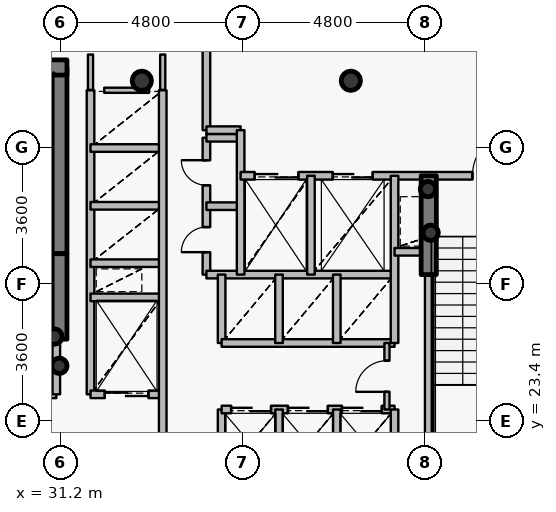
"""IFC4 building model, lengths in metres.
Left out: names, types, materials, properties, quantities, classifications, styles, units other than length and angle.
Written with IfcOpenShell. Run it as: python <this file> out.ifc"""

import sys

from ifc_helpers import new_model, si_unit, direction, frame, frame_2d, origin, origin_2d, place, context, subcontext, project, spatial, rectangle, hollow_circle, extrude, source, transform, mapped, element, fill, save


model = new_model("IFC4")
c1 = context("Model", 3, precision=1e-05, world=origin(), true_north=direction((0.0, 1.0)))
c2 = subcontext(c1, "Body", "Model", "MODEL_VIEW")
j1 = project(units=[si_unit("LENGTHUNIT", "METRE"), si_unit("PLANEANGLEUNIT", "RADIAN")], contexts=[c1])
p1 = place(None, origin())
s1 = spatial("IfcSite", under=j1, at=p1, CompositionType="ELEMENT")
p2 = place(p1, origin())
s2 = spatial("IfcBuilding", under=s1, at=p2, CompositionType="ELEMENT")
p3 = place(p2, frame((0.0, 0.0, 36.6)))
s3 = spatial("IfcBuildingStorey", under=s2, at=p3, CompositionType="ELEMENT", Elevation=36.6)
for number, where, z_axis, x_axis in (
    (1, (38.85, 32.35, 0.0), (0.0, 0.0, 1.0), (1.0, 0.0, 0.0)),
    (2, (33.35, 32.35, 0.0), (0.0, 0.0, 1.0), (1.0, 0.0, 0.0)),
):
    element("IfcColumn", number, at=place(p3, frame(where, z_axis=z_axis, x_axis=x_axis)), inside=s3, PredefinedType="COLUMN", context=c2, shape_type="SweptSolid", body=[
        extrude(hollow_circle(Radius=0.254, WallThickness=0.02, at=origin_2d()), origin(), (0.0, 0.0, 1.0), 4.2),
    ])
p4 = place(p3, frame((31.18, 27.8, 0.0), z_axis=(0.0, 0.0, 1.0), x_axis=(0.0, 1.0, 0.0)))
e3 = element("IfcWall", 3, at=p4, inside=s3, PredefinedType="SHEAR", context=c2, shape_type="SweptSolid", body=[
    extrude(rectangle(XDim=4.9, YDim=0.4, at=frame_2d((2.45, 0.0))), origin(), (0.0, 0.0, 1.0), 4.2),
])
p5 = place(p3, frame((27.28, 32.7, 0.0), z_axis=(0.0, 0.0, 1.0), x_axis=(1.0, 0.0, 0.0)))
e4 = element("IfcWall", 4, at=p5, inside=s3, PredefinedType="SHEAR", context=c2, shape_type="SweptSolid", body=[
    extrude(rectangle(XDim=4.1, YDim=0.4, at=frame_2d((2.05, 0.0))), origin(), (0.0, 0.0, 1.0), 4.2),
])
for number, where, z_axis, x_axis in (
    (5, (31.05, 25.62, 0.0), (0.0, 0.0, 1.0), (1.0, 0.0, 0.0)),
    (6, (31.18, 24.85, 0.0), (0.0, 0.0, 1.0), (1.0, 0.0, 0.0)),
    (7, (40.95, 28.35, 0.0), (0.0, 0.0, 1.0), (1.0, 0.0, 0.0)),
    (8, (40.88, 29.5, 0.0), (0.0, 0.0, 1.0), (1.0, 0.0, 0.0)),
):
    element("IfcColumn", number, at=place(p3, frame(where, z_axis=z_axis, x_axis=x_axis)), inside=s3, PredefinedType="COLUMN", context=c2, shape_type="SweptSolid", body=[
        extrude(hollow_circle(Radius=0.203, WallThickness=0.016, at=origin_2d()), origin(), (0.0, 0.0, 1.0), 4.2),
    ])
p6 = place(p3, frame((31.18, 25.55, 0.0), z_axis=(0.0, 0.0, 1.0), x_axis=(0.0, 1.0, 0.0)))
e9 = element("IfcWall", 9, at=p6, inside=s3, PredefinedType="SHEAR", context=c2, shape_type="SweptSolid", body=[
    extrude(rectangle(XDim=2.25, YDim=0.4, at=frame_2d((1.125, 0.0))), origin(), (0.0, 0.0, 1.0), 3.55),
])
p7 = place(p3, frame((40.9, 27.25, 0.0), z_axis=(0.0, 0.0, 1.0), x_axis=(0.0, 1.0, 0.0)))
e10 = element("IfcWall", 10, at=p7, inside=s3, PredefinedType="SHEAR", context=c2, shape_type="SweptSolid", body=[
    extrude(rectangle(XDim=2.6, YDim=0.4, at=frame_2d((1.3, 0.0))), origin(), (0.0, 0.0, 1.0), 3.55),
])
p8 = place(p3, frame((27.56, 24.1, 0.0), z_axis=(0.0, 0.0, 1.0), x_axis=(1.0, 0.0, 0.0)))
e11 = element("IfcWall", 11, at=p8, inside=s3, PredefinedType="PARTITIONING", context=c2, shape_type="SweptSolid", body=[
    extrude(rectangle(XDim=3.54, YDim=0.2, at=frame_2d((1.77, 0.0))), origin(), (0.0, 0.0, 1.0), 3.95),
])
p9 = place(p8, frame((1.17, 0.0, 0.0)))
e12 = element("IfcOpeningElement", 12, at=p9, cuts=e11, PredefinedType="OPENING", context=c2, shape_type="SweptSolid", body=[
    extrude(rectangle(XDim=1.2, YDim=2.15, at=origin_2d()), frame((0.6, 0.11, 1.075), z_axis=(0.0, -1.0, 0.0), x_axis=(1.0, 0.0, 0.0)), (0.0, 0.0, 1.0), 0.22),
])
p10 = place(p3, frame((31.1, 24.1, 0.0), z_axis=(0.0, 0.0, 1.0), x_axis=(0.0, 1.0, 0.0)))
e13 = element("IfcWall", 13, at=p10, inside=s3, PredefinedType="PARTITIONING", context=c2, shape_type="SweptSolid", body=[
    extrude(rectangle(XDim=1.44, YDim=0.2, at=frame_2d((0.72, 0.0))), origin(), (0.0, 0.0, 1.0), 3.95),
])
p11 = place(p3, frame((32.0, 24.1, 0.0), z_axis=(0.0, 0.0, 1.0), x_axis=(0.0, 1.0, 0.0)))
e14 = element("IfcWall", 14, at=p11, inside=s3, PredefinedType="PARTITIONING", context=c2, shape_type="SweptSolid", body=[
    extrude(rectangle(XDim=8.0, YDim=0.2, at=frame_2d((4.0, 0.0))), origin(), (0.0, 0.0, 1.0), 3.95),
])
p12 = place(p3, frame((32.0, 24.1, 0.0), z_axis=(0.0, 0.0, 1.0), x_axis=(1.0, 0.0, 0.0)))
e15 = element("IfcWall", 15, at=p12, inside=s3, PredefinedType="PARTITIONING", context=c2, shape_type="SweptSolid", body=[
    extrude(rectangle(XDim=1.9, YDim=0.2, at=frame_2d((0.95, 0.0))), origin(), (0.0, 0.0, 1.0), 3.535),
])
p13 = place(p12, frame((0.375, 0.0, 0.0)))
e16 = element("IfcOpeningElement", 16, at=p13, cuts=e15, PredefinedType="OPENING", context=c2, shape_type="SweptSolid", body=[
    extrude(rectangle(XDim=1.15, YDim=2.15, at=origin_2d()), frame((0.575, 0.11, 1.075), z_axis=(0.0, -1.0, 0.0), x_axis=(1.0, 0.0, 0.0)), (0.0, 0.0, 1.0), 0.22),
])
for number, where, z_axis, x_axis in (
    (17, (32.0, 26.65, 0.0), (0.0, 0.0, 1.0), (1.0, 0.0, 0.0)),
    (18, (32.0, 27.55, 0.0), (0.0, 0.0, 1.0), (1.0, 0.0, 0.0)),
    (19, (32.0, 29.06, 0.0), (0.0, 0.0, 1.0), (1.0, 0.0, 0.0)),
    (20, (32.0, 30.58, 0.0), (0.0, 0.0, 1.0), (1.0, 0.0, 0.0)),
):
    element("IfcWall", number, at=place(p3, frame(where, z_axis=z_axis, x_axis=x_axis)), inside=s3, PredefinedType="PARTITIONING", context=c2, shape_type="SweptSolid", body=[
        extrude(rectangle(XDim=1.9, YDim=0.2, at=frame_2d((0.95, 0.0))), origin(), (0.0, 0.0, 1.0), 3.535),
    ])
p14 = place(p3, frame((33.9, 20.7, 0.0), z_axis=(0.0, 0.0, 1.0), x_axis=(0.0, 1.0, 0.0)))
e21 = element("IfcWall", 21, at=p14, inside=s3, PredefinedType="PARTITIONING", context=c2, shape_type="SweptSolid", body=[
    extrude(rectangle(XDim=11.4, YDim=0.2, at=frame_2d((5.7, 0.0))), origin(), (0.0, 0.0, 1.0), 3.535),
])
p15 = place(p3, frame((35.05, 27.25, 0.0), z_axis=(0.0, 0.0, 1.0), x_axis=(0.0, 1.0, 0.0)))
e22 = element("IfcWall", 22, at=p15, inside=s3, PredefinedType="PARTITIONING", context=c2, shape_type="SweptSolid", body=[
    extrude(rectangle(XDim=3.6, YDim=0.2, at=frame_2d((1.8, 0.0))), origin(), (0.0, 0.0, 1.0), 3.95),
])
p16 = place(p15, frame((0.59, 0.0, 0.0)))
e23 = element("IfcOpeningElement", 23, at=p16, cuts=e22, PredefinedType="OPENING", context=c2, shape_type="SweptSolid", body=[
    extrude(rectangle(XDim=0.66, YDim=2.05, at=origin_2d()), frame((0.33, 0.11, 1.025), z_axis=(0.0, -1.0, 0.0), x_axis=(1.0, 0.0, 0.0)), (0.0, 0.0, 1.0), 0.22),
])
p17 = place(p15, frame((2.35, 0.0, 0.0)))
e24 = element("IfcOpeningElement", 24, at=p17, cuts=e22, PredefinedType="OPENING", context=c2, shape_type="SweptSolid", body=[
    extrude(rectangle(XDim=0.66, YDim=2.05, at=origin_2d()), frame((0.33, 0.11, 1.025), z_axis=(0.0, -1.0, 0.0), x_axis=(1.0, 0.0, 0.0)), (0.0, 0.0, 1.0), 0.22),
])
p18 = place(p3, frame((35.05, 27.25, 0.0), z_axis=(0.0, 0.0, 1.0), x_axis=(1.0, 0.0, 0.0)))
e25 = element("IfcWall", 25, at=p18, inside=s3, PredefinedType="PARTITIONING", context=c2, shape_type="SweptSolid", body=[
    extrude(rectangle(XDim=4.95, YDim=0.2, at=frame_2d((2.475, 0.0))), origin(), (0.0, 0.0, 1.0), 3.535),
])
for number, where, z_axis, x_axis in (
    (26, (35.05, 29.05, 0.0), (0.0, 0.0, 1.0), (1.0, 0.0, 0.0)),
    (27, (35.05, 30.85, 0.0), (0.0, 0.0, 1.0), (1.0, 0.0, 0.0)),
):
    element("IfcWall", number, at=place(p3, frame(where, z_axis=z_axis, x_axis=x_axis)), inside=s3, PredefinedType="PARTITIONING", context=c2, shape_type="SweptSolid", body=[
        extrude(rectangle(XDim=0.9, YDim=0.2, at=frame_2d((0.45, 0.0))), origin(), (0.0, 0.0, 1.0), 3.95),
    ])
p19 = place(p3, frame((35.05, 31.05, 0.0), z_axis=(0.0, 0.0, 1.0), x_axis=(0.0, 1.0, 0.0)))
e28 = element("IfcWall", 28, at=p19, inside=s3, PredefinedType="PARTITIONING", context=c2, shape_type="SweptSolid", body=[
    extrude(rectangle(XDim=2.25, YDim=0.2, at=frame_2d((1.125, 0.0))), origin(), (0.0, 0.0, 1.0), 3.535),
])
p20 = place(p3, frame((35.05, 31.05, 0.0), z_axis=(0.0, 0.0, 1.0), x_axis=(1.0, 0.0, 0.0)))
e29 = element("IfcWall", 29, at=p20, inside=s3, PredefinedType="PARTITIONING", context=c2, shape_type="SweptSolid", body=[
    extrude(rectangle(XDim=0.9, YDim=0.2, at=frame_2d((0.45, 0.0))), origin(), (0.0, 0.0, 1.0), 3.95),
])
p21 = place(p3, frame((35.45, 21.9, 0.0), z_axis=(0.0, 0.0, 1.0), x_axis=(0.0, 1.0, 0.0)))
e30 = element("IfcWall", 30, at=p21, inside=s3, PredefinedType="PARTITIONING", context=c2, shape_type="SweptSolid", body=[
    extrude(rectangle(XDim=1.8, YDim=0.2, at=frame_2d((0.9, 0.0))), origin(), (0.0, 0.0, 1.0), 3.95),
])
p22 = place(p3, frame((35.45, 23.7, 0.0), z_axis=(0.0, 0.0, 1.0), x_axis=(1.0, 0.0, 0.0)))
e31 = element("IfcWall", 31, at=p22, inside=s3, PredefinedType="PARTITIONING", context=c2, shape_type="SweptSolid", body=[
    extrude(rectangle(XDim=4.55, YDim=0.2, at=frame_2d((2.275, 0.0))), origin(), (0.0, 0.0, 1.0), 3.535),
])
p23 = place(p22, frame((0.25, 0.0, 0.0)))
e32 = element("IfcOpeningElement", 32, at=p23, cuts=e31, PredefinedType="OPENING", context=c2, shape_type="SweptSolid", body=[
    extrude(rectangle(XDim=1.05, YDim=2.15, at=origin_2d()), frame((0.525, 0.11, 1.075), z_axis=(0.0, -1.0, 0.0), x_axis=(1.0, 0.0, 0.0)), (0.0, 0.0, 1.0), 0.22),
])
p24 = place(p22, frame((1.745, 0.0, 0.0)))
e33 = element("IfcOpeningElement", 33, at=p24, cuts=e31, PredefinedType="OPENING", context=c2, shape_type="SweptSolid", body=[
    extrude(rectangle(XDim=1.05, YDim=2.15, at=origin_2d()), frame((0.525, 0.11, 1.075), z_axis=(0.0, -1.0, 0.0), x_axis=(1.0, 0.0, 0.0)), (0.0, 0.0, 1.0), 0.22),
])
p25 = place(p22, frame((3.165, 0.0, 0.0)))
e34 = element("IfcOpeningElement", 34, at=p25, cuts=e31, PredefinedType="OPENING", context=c2, shape_type="SweptSolid", body=[
    extrude(rectangle(XDim=1.05, YDim=2.15, at=origin_2d()), frame((0.525, 0.11, 1.075), z_axis=(0.0, -1.0, 0.0), x_axis=(1.0, 0.0, 0.0)), (0.0, 0.0, 1.0), 0.22),
])
p26 = place(p3, frame((35.45, 25.45, 0.0), z_axis=(0.0, 0.0, 1.0), x_axis=(0.0, 1.0, 0.0)))
e35 = element("IfcWall", 35, at=p26, inside=s3, PredefinedType="PARTITIONING", context=c2, shape_type="SweptSolid", body=[
    extrude(rectangle(XDim=1.8, YDim=0.2, at=frame_2d((0.9, 0.0))), origin(), (0.0, 0.0, 1.0), 3.95),
])
p27 = place(p3, frame((35.45, 25.45, 0.0), z_axis=(0.0, 0.0, 1.0), x_axis=(1.0, 0.0, 0.0)))
e36 = element("IfcWall", 36, at=p27, inside=s3, PredefinedType="PARTITIONING", context=c2, shape_type="SweptSolid", body=[
    extrude(rectangle(XDim=4.55, YDim=0.2, at=frame_2d((2.275, 0.0))), origin(), (0.0, 0.0, 1.0), 3.535),
])
p28 = place(p3, frame((35.95, 27.25, 0.0), z_axis=(0.0, 0.0, 1.0), x_axis=(0.0, 1.0, 0.0)))
e37 = element("IfcWall", 37, at=p28, inside=s3, PredefinedType="PARTITIONING", context=c2, shape_type="SweptSolid", body=[
    extrude(rectangle(XDim=3.8, YDim=0.2, at=frame_2d((1.9, 0.0))), origin(), (0.0, 0.0, 1.0), 3.95),
])
p29 = place(p3, frame((35.95, 29.85, 0.0), z_axis=(0.0, 0.0, 1.0), x_axis=(1.0, 0.0, 0.0)))
e38 = element("IfcWall", 38, at=p29, inside=s3, PredefinedType="PARTITIONING", context=c2, shape_type="SweptSolid", body=[
    extrude(rectangle(XDim=8.49, YDim=0.2, at=frame_2d((4.245, 0.0))), origin(), (0.0, 0.0, 1.0), 3.535),
])
p30 = place(p29, frame((6.1, 0.0, 0.0)))
e39 = element("IfcOpeningElement", 39, at=p30, cuts=e38, PredefinedType="OPENING", context=c2, shape_type="SweptSolid", body=[
    extrude(rectangle(XDim=1.2, YDim=2.15, at=origin_2d()), frame((0.6, 0.11, 1.075), z_axis=(0.0, -1.0, 0.0), x_axis=(1.0, 0.0, 0.0)), (0.0, 0.0, 1.0), 0.22),
])
p31 = place(p29, frame((0.37, 0.0, 0.0)))
e40 = element("IfcOpeningElement", 40, at=p31, cuts=e38, PredefinedType="OPENING", context=c2, shape_type="SweptSolid", body=[
    extrude(rectangle(XDim=1.15, YDim=2.15, at=origin_2d()), frame((0.575, 0.11, 1.075), z_axis=(0.0, -1.0, 0.0), x_axis=(1.0, 0.0, 0.0)), (0.0, 0.0, 1.0), 0.22),
])
p32 = place(p29, frame((2.425, 0.0, 0.0)))
e41 = element("IfcOpeningElement", 41, at=p32, cuts=e38, PredefinedType="OPENING", context=c2, shape_type="SweptSolid", body=[
    extrude(rectangle(XDim=1.05, YDim=2.15, at=origin_2d()), frame((0.525, 0.11, 1.075), z_axis=(0.0, -1.0, 0.0), x_axis=(1.0, 0.0, 0.0)), (0.0, 0.0, 1.0), 0.22),
])
for number, where, z_axis, x_axis in (
    (42, (36.96, 21.9, 0.0), (0.0, 0.0, 1.0), (0.0, 1.0, 0.0)),
    (43, (36.96, 25.45, 0.0), (0.0, 0.0, 1.0), (0.0, 1.0, 0.0)),
):
    element("IfcWall", number, at=place(p3, frame(where, z_axis=z_axis, x_axis=x_axis)), inside=s3, PredefinedType="PARTITIONING", context=c2, shape_type="SweptSolid", body=[
        extrude(rectangle(XDim=1.8, YDim=0.2, at=frame_2d((0.9, 0.0))), origin(), (0.0, 0.0, 1.0), 3.95),
    ])
p33 = place(p3, frame((37.8, 27.25, 0.0), z_axis=(0.0, 0.0, 1.0), x_axis=(0.0, 1.0, 0.0)))
e44 = element("IfcWall", 44, at=p33, inside=s3, PredefinedType="PARTITIONING", context=c2, shape_type="SweptSolid", body=[
    extrude(rectangle(XDim=2.6, YDim=0.2, at=frame_2d((1.3, 0.0))), origin(), (0.0, 0.0, 1.0), 3.95),
])
for number, where, z_axis, x_axis in (
    (45, (38.48, 21.9, 0.0), (0.0, 0.0, 1.0), (0.0, 1.0, 0.0)),
    (46, (38.48, 25.45, 0.0), (0.0, 0.0, 1.0), (0.0, 1.0, 0.0)),
):
    element("IfcWall", number, at=place(p3, frame(where, z_axis=z_axis, x_axis=x_axis)), inside=s3, PredefinedType="PARTITIONING", context=c2, shape_type="SweptSolid", body=[
        extrude(rectangle(XDim=1.8, YDim=0.2, at=frame_2d((0.9, 0.0))), origin(), (0.0, 0.0, 1.0), 3.95),
    ])
p34 = place(p3, frame((39.8, 23.7, 0.0), z_axis=(0.0, 0.0, 1.0), x_axis=(0.0, 1.0, 0.0)))
e47 = element("IfcWall", 47, at=p34, inside=s3, PredefinedType="PARTITIONING", context=c2, shape_type="SweptSolid", body=[
    extrude(rectangle(XDim=1.75, YDim=0.135, at=frame_2d((0.875, 0.0))), origin(), (0.0, 0.0, 1.0), 3.95),
])
p35 = place(p34, frame((0.465, 0.0, 0.0)))
e48 = element("IfcOpeningElement", 48, at=p35, cuts=e47, PredefinedType="OPENING", context=c2, shape_type="SweptSolid", body=[
    extrude(rectangle(XDim=0.82, YDim=2.1, at=origin_2d()), frame((0.41, 0.078, 1.05), z_axis=(0.0, -1.0, 0.0), x_axis=(1.0, 0.0, 0.0)), (0.0, 0.0, 1.0), 0.155),
])
p36 = place(p3, frame((40.0, 21.9, 0.0), z_axis=(0.0, 0.0, 1.0), x_axis=(0.0, 1.0, 0.0)))
e49 = element("IfcWall", 49, at=p36, inside=s3, PredefinedType="PARTITIONING", context=c2, shape_type="SweptSolid", body=[
    extrude(rectangle(XDim=1.8, YDim=0.2, at=frame_2d((0.9, 0.0))), origin(), (0.0, 0.0, 1.0), 3.95),
])
p37 = place(p3, frame((40.0, 25.45, 0.0), z_axis=(0.0, 0.0, 1.0), x_axis=(0.0, 1.0, 0.0)))
e50 = element("IfcWall", 50, at=p37, inside=s3, PredefinedType="PARTITIONING", context=c2, shape_type="SweptSolid", body=[
    extrude(rectangle(XDim=4.4, YDim=0.2, at=frame_2d((2.2, 0.0))), origin(), (0.0, 0.0, 1.0), 3.95),
])
p38 = place(p3, frame((40.0, 27.85, 0.0), z_axis=(0.0, 0.0, 1.0), x_axis=(1.0, 0.0, 0.0)))
e51 = element("IfcWall", 51, at=p38, inside=s3, PredefinedType="PARTITIONING", context=c2, shape_type="SweptSolid", body=[
    extrude(rectangle(XDim=0.9, YDim=0.2, at=frame_2d((0.45, 0.0))), origin(), (0.0, 0.0, 1.0), 3.95),
])
p39 = place(p3, frame((40.9, 21.33, 0.0), z_axis=(0.0, 0.0, 1.0), x_axis=(0.0, 1.0, 0.0)))
e52 = element("IfcWall", 52, at=p39, inside=s3, PredefinedType="PARTITIONING", context=c2, shape_type="SweptSolid", body=[
    extrude(rectangle(XDim=5.91, YDim=0.2, at=frame_2d((2.955, 0.0))), origin(), (0.0, 0.0, 1.0), 3.485),
])
p40 = place(p3, frame((32.36, 32.1, 0.0), z_axis=(0.0, 0.0, 1.0), x_axis=(1.0, 0.0, 0.0)))
e53 = element("IfcWall", 53, at=p40, inside=s3, PredefinedType="PARTITIONING", context=c2, shape_type="SweptSolid", body=[
    extrude(rectangle(XDim=1.18, YDim=0.135, at=frame_2d((0.59, 0.0))), origin(), (0.0, 0.0, 1.0), 3.535),
])
p41 = place(p3, frame((32.0, 33.04, 0.0), z_axis=(0.0, 0.0, 1.0), x_axis=(0.0, -1.0, 0.0)))
e54 = element("IfcWall", 54, at=p41, inside=s3, PredefinedType="PARTITIONING", context=c2, shape_type="SweptSolid", body=[
    extrude(rectangle(XDim=0.93, YDim=0.135, at=frame_2d((0.465, 0.0))), origin(), (0.0, 0.0, 1.0), 3.485),
])
p42 = place(p3, frame((33.9, 32.11, 0.0), z_axis=(0.0, 0.0, 1.0), x_axis=(0.0, 1.0, 0.0)))
e55 = element("IfcWall", 55, at=p42, inside=s3, PredefinedType="PARTITIONING", context=c2, shape_type="SweptSolid", body=[
    extrude(rectangle(XDim=0.93, YDim=0.135, at=frame_2d((0.465, 0.0))), origin(), (0.0, 0.0, 1.0), 3.535),
])
m1 = source(origin(), c2, "Body", "SweptSolid", [
    extrude(rectangle(XDim=1.2, YDim=2.15, at=origin_2d()), frame((0.6, 0.025, 1.075), z_axis=(0.0, -1.0, 0.0), x_axis=(1.0, 0.0, 0.0)), (0.0, 0.0, 1.0), 0.05),
])
p43 = place(p30, origin())
e56 = element("IfcDoor", 56, at=p43, inside=s3, OperationType="SINGLE_SWING_RIGHT", PredefinedType="DOOR", context=c2, shape_type="MappedRepresentation", body=[
    mapped(m1, transform((0.0, 0.0, 0.0), x_axis=(1.0, 0.0, 0.0), y_axis=(0.0, 1.0, 0.0), z_axis=(0.0, 0.0, 1.0), scale=1.0)),
])
fill(e39, e56)
m2 = source(origin(), c2, "Body", "SweptSolid", [
    extrude(rectangle(XDim=1.15, YDim=2.15, at=origin_2d()), frame((0.575, 0.025, 1.075), z_axis=(0.0, -1.0, 0.0), x_axis=(1.0, 0.0, 0.0)), (0.0, 0.0, 1.0), 0.05),
])
p44 = place(p31, origin())
e57 = element("IfcDoor", 57, at=p44, inside=s3, OperationType="DOUBLE_DOOR_SLIDING", PredefinedType="USERDEFINED", context=c2, shape_type="MappedRepresentation", body=[
    mapped(m2, transform((0.0, 0.0, 0.0), x_axis=(1.0, 0.0, 0.0), y_axis=(0.0, 1.0, 0.0), z_axis=(0.0, 0.0, 1.0), scale=1.0)),
])
fill(e40, e57)
p45 = place(p13, origin())
e58 = element("IfcDoor", 58, at=p45, inside=s3, OperationType="DOUBLE_DOOR_SLIDING", PredefinedType="USERDEFINED", context=c2, shape_type="MappedRepresentation", body=[
    mapped(m2, transform((0.0, 0.0, 0.0), x_axis=(1.0, 0.0, 0.0), y_axis=(0.0, 1.0, 0.0), z_axis=(0.0, 0.0, 1.0), scale=1.0)),
])
fill(e16, e58)
m3 = source(origin(), c2, "Body", "SweptSolid", [
    extrude(rectangle(XDim=1.05, YDim=2.15, at=origin_2d()), frame((0.525, 0.025, 1.075), z_axis=(0.0, -1.0, 0.0), x_axis=(1.0, 0.0, 0.0)), (0.0, 0.0, 1.0), 0.05),
])
p46 = place(p32, origin())
e59 = element("IfcDoor", 59, at=p46, inside=s3, OperationType="DOUBLE_DOOR_SLIDING", PredefinedType="USERDEFINED", context=c2, shape_type="MappedRepresentation", body=[
    mapped(m3, transform((0.0, 0.0, 0.0), x_axis=(1.0, 0.0, 0.0), y_axis=(0.0, 1.0, 0.0), z_axis=(0.0, 0.0, 1.0), scale=1.0)),
])
fill(e41, e59)
p47 = place(p23, origin())
e60 = element("IfcDoor", 60, at=p47, inside=s3, OperationType="DOUBLE_DOOR_SLIDING", PredefinedType="USERDEFINED", context=c2, shape_type="MappedRepresentation", body=[
    mapped(m3, transform((0.0, 0.0, 0.0), x_axis=(1.0, 0.0, 0.0), y_axis=(0.0, 1.0, 0.0), z_axis=(0.0, 0.0, 1.0), scale=1.0)),
])
fill(e32, e60)
p48 = place(p24, origin())
e61 = element("IfcDoor", 61, at=p48, inside=s3, OperationType="DOUBLE_DOOR_SLIDING", PredefinedType="USERDEFINED", context=c2, shape_type="MappedRepresentation", body=[
    mapped(m3, transform((0.0, 0.0, 0.0), x_axis=(1.0, 0.0, 0.0), y_axis=(0.0, 1.0, 0.0), z_axis=(0.0, 0.0, 1.0), scale=1.0)),
])
fill(e33, e61)
p49 = place(p25, origin())
e62 = element("IfcDoor", 62, at=p49, inside=s3, OperationType="DOUBLE_DOOR_SLIDING", PredefinedType="USERDEFINED", context=c2, shape_type="MappedRepresentation", body=[
    mapped(m3, transform((0.0, 0.0, 0.0), x_axis=(1.0, 0.0, 0.0), y_axis=(0.0, 1.0, 0.0), z_axis=(0.0, 0.0, 1.0), scale=1.0)),
])
fill(e34, e62)
m4 = source(origin(), c2, "Body", "SweptSolid", [
    extrude(rectangle(XDim=0.66, YDim=2.05, at=origin_2d()), frame((0.33, 0.025, 1.025), z_axis=(0.0, -1.0, 0.0), x_axis=(1.0, 0.0, 0.0)), (0.0, 0.0, 1.0), 0.05),
])
p50 = place(p16, origin())
e63 = element("IfcDoor", 63, at=p50, inside=s3, OperationType="SINGLE_SWING_LEFT", PredefinedType="USERDEFINED", context=c2, shape_type="MappedRepresentation", body=[
    mapped(m4, transform((0.0, 0.0, 0.0), x_axis=(1.0, 0.0, 0.0), y_axis=(0.0, 1.0, 0.0), z_axis=(0.0, 0.0, 1.0), scale=1.0)),
])
fill(e23, e63)
p51 = place(p17, origin())
e64 = element("IfcDoor", 64, at=p51, inside=s3, OperationType="SINGLE_SWING_RIGHT", PredefinedType="USERDEFINED", context=c2, shape_type="MappedRepresentation", body=[
    mapped(m4, transform((0.0, 0.0, 0.0), x_axis=(1.0, 0.0, 0.0), y_axis=(0.0, 1.0, 0.0), z_axis=(0.0, 0.0, 1.0), scale=1.0)),
])
fill(e24, e64)
m5 = source(origin(), c2, "Body", "SweptSolid", [
    extrude(rectangle(XDim=0.82, YDim=2.1, at=origin_2d()), frame((0.41, 0.025, 1.05), z_axis=(0.0, -1.0, 0.0), x_axis=(1.0, 0.0, 0.0)), (0.0, 0.0, 1.0), 0.05),
])
p52 = place(p35, origin())
e65 = element("IfcDoor", 65, at=p52, inside=s3, OperationType="SINGLE_SWING_LEFT", PredefinedType="DOOR", context=c2, shape_type="MappedRepresentation", body=[
    mapped(m5, transform((0.0, 0.0, 0.0), x_axis=(1.0, 0.0, 0.0), y_axis=(0.0, 1.0, 0.0), z_axis=(0.0, 0.0, 1.0), scale=1.0)),
])
fill(e48, e65)
save(model, sys.argv[1])
